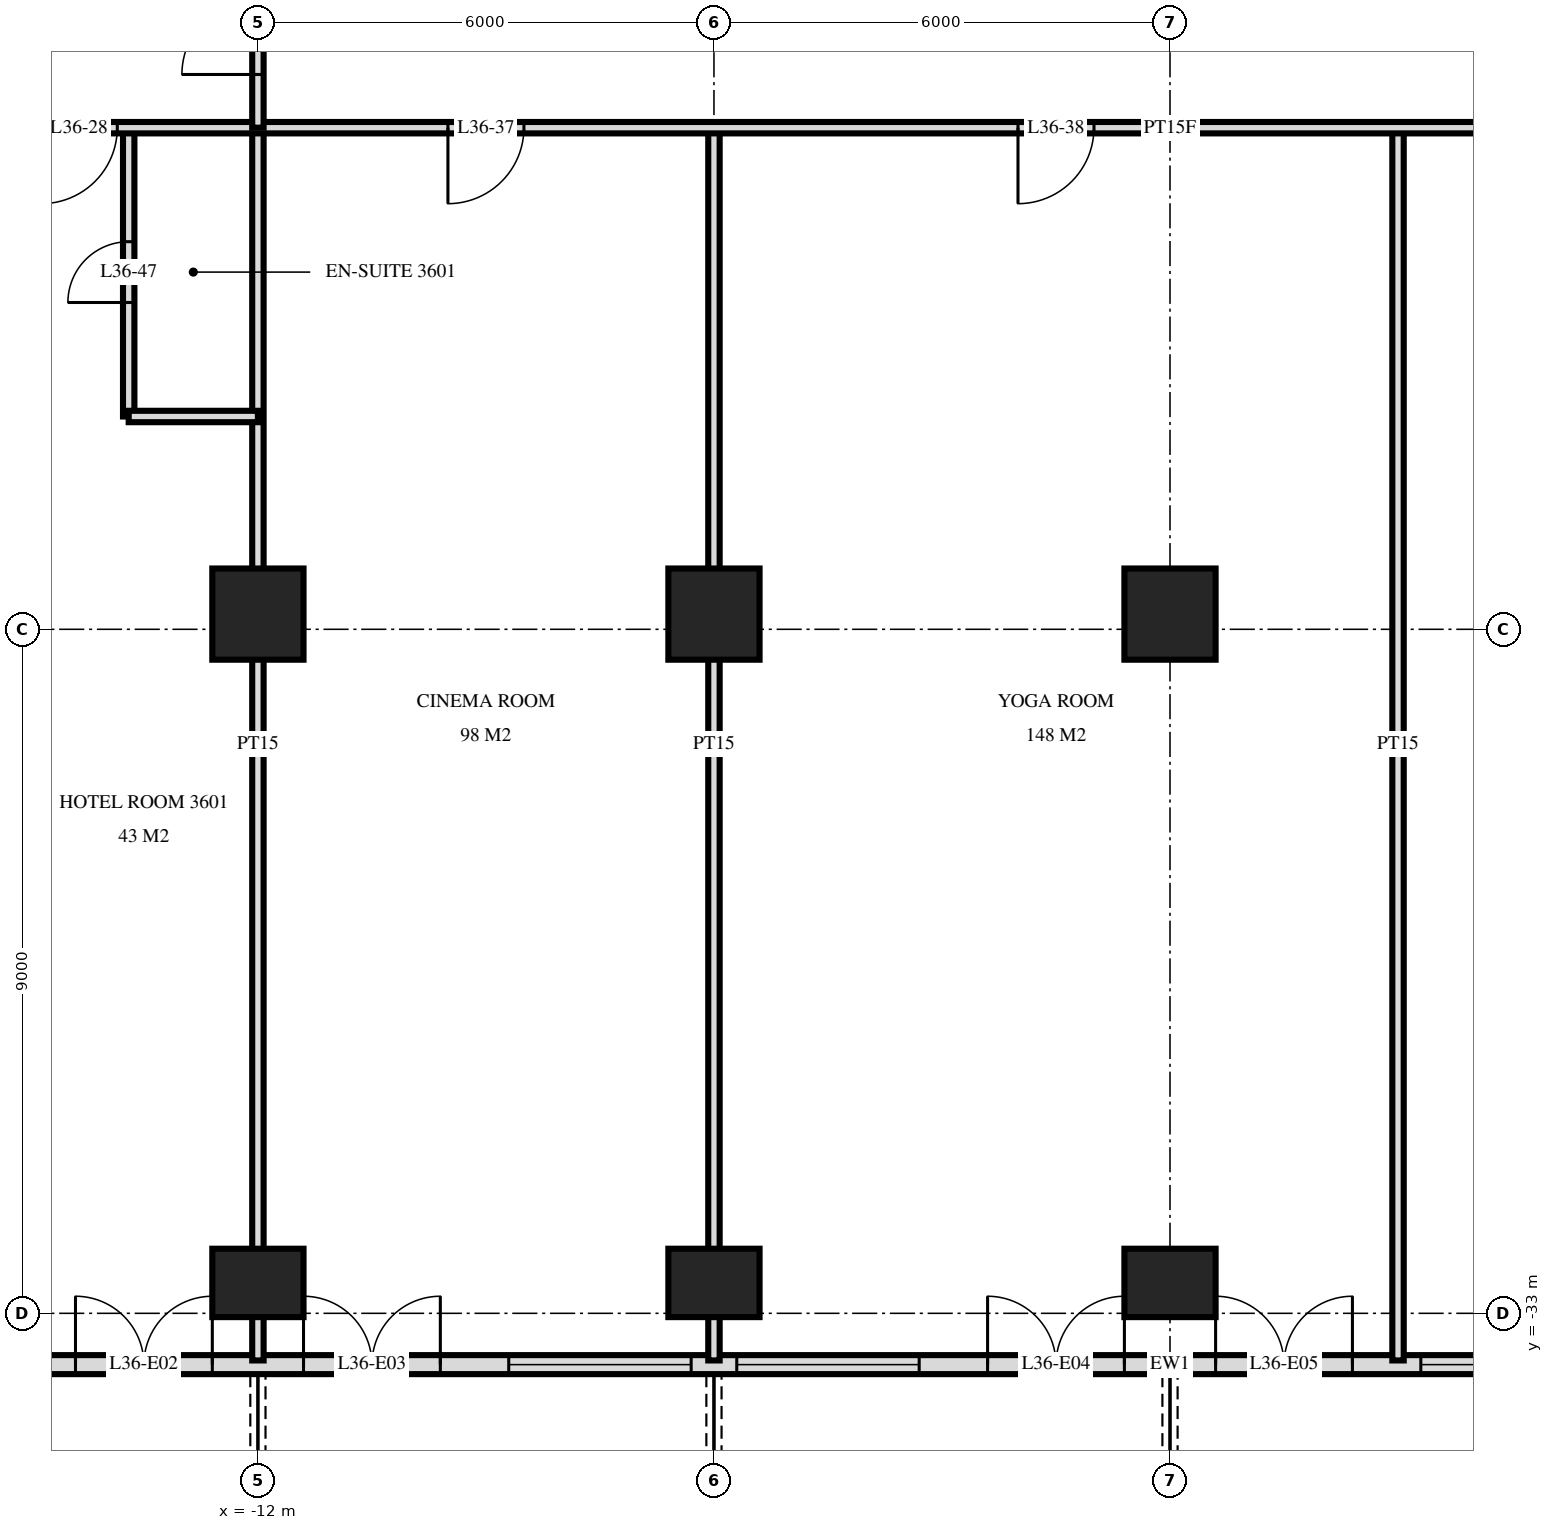
"""IFC4 building model, lengths in metres.
Left out: names, types, materials, properties, quantities, classifications, styles, units other than length and angle.
Written with IfcOpenShell. Run it as: python <this file> out.ifc"""

import sys

from ifc_helpers import new_model, si_unit, direction, frame, frame_2d, origin, origin_2d, place, context, subcontext, project, spatial, rectangle, extrude, element, fill, save


model = new_model("IFC4")
c1 = context("Model", 3, precision=1e-05, world=origin(), true_north=direction((0.0, 1.0)))
c2 = subcontext(c1, "Body", "Model", "MODEL_VIEW")
j1 = project(units=[si_unit("LENGTHUNIT", "METRE"), si_unit("PLANEANGLEUNIT", "RADIAN")], contexts=[c1])
p1 = place(None, origin())
s1 = spatial("IfcSite", under=j1, at=p1, CompositionType="ELEMENT")
p2 = place(p1, origin())
s2 = spatial("IfcBuilding", under=s1, at=p2, CompositionType="ELEMENT")
p3 = place(p2, frame((0.0, 0.0, 141.6)))
s3 = spatial("IfcBuildingStorey", under=s2, at=p3, CompositionType="ELEMENT", Elevation=141.6)
p4 = place(p3, frame((-12.0, -32.6, 0.0), z_axis=(0.0, 0.0, 1.0), x_axis=(1.0, 0.0, 0.0)))
e1 = element("IfcColumn", 1, at=p4, inside=s3, PredefinedType="COLUMN", context=c2, shape_type="SweptSolid", body=[
    extrude(rectangle(XDim=1.2, YDim=0.9, at=origin_2d()), origin(), (0.0, 0.0, 1.0), 3.6),
])
p5 = place(p3, frame((-12.0, -23.8, 0.0), z_axis=(0.0, 0.0, 1.0), x_axis=(1.0, 0.0, 0.0)))
e2 = element("IfcColumn", 2, at=p5, inside=s3, PredefinedType="COLUMN", context=c2, shape_type="SweptSolid", body=[
    extrude(rectangle(XDim=1.2, YDim=1.2, at=origin_2d()), origin(), (0.0, 0.0, 1.0), 3.6),
])
p6 = place(p3, frame((-6.0, -32.6, 0.0), z_axis=(0.0, 0.0, 1.0), x_axis=(1.0, 0.0, 0.0)))
e3 = element("IfcColumn", 3, at=p6, inside=s3, PredefinedType="COLUMN", context=c2, shape_type="SweptSolid", body=[
    extrude(rectangle(XDim=1.2, YDim=0.9, at=origin_2d()), origin(), (0.0, 0.0, 1.0), 3.6),
])
p7 = place(p3, frame((-6.0, -23.8, 0.0), z_axis=(0.0, 0.0, 1.0), x_axis=(1.0, 0.0, 0.0)))
e4 = element("IfcColumn", 4, at=p7, inside=s3, PredefinedType="COLUMN", context=c2, shape_type="SweptSolid", body=[
    extrude(rectangle(XDim=1.2, YDim=1.2, at=origin_2d()), origin(), (0.0, 0.0, 1.0), 3.6),
])
p8 = place(p3, frame((0.0, -32.6, 0.0), z_axis=(0.0, 0.0, 1.0), x_axis=(1.0, 0.0, 0.0)))
e5 = element("IfcColumn", 5, at=p8, inside=s3, PredefinedType="COLUMN", context=c2, shape_type="SweptSolid", body=[
    extrude(rectangle(XDim=1.2, YDim=0.9, at=origin_2d()), origin(), (0.0, 0.0, 1.0), 3.6),
])
p9 = place(p3, frame((0.0, -23.8, 0.0), z_axis=(0.0, 0.0, 1.0), x_axis=(1.0, 0.0, 0.0)))
e6 = element("IfcColumn", 6, at=p9, inside=s3, PredefinedType="COLUMN", context=c2, shape_type="SweptSolid", body=[
    extrude(rectangle(XDim=1.2, YDim=1.2, at=origin_2d()), origin(), (0.0, 0.0, 1.0), 3.6),
])
p10 = place(p3, frame((-23.675, -33.675, 0.0), z_axis=(0.0, 0.0, 1.0), x_axis=(1.0, 0.0, 0.0)))
e7 = element("IfcWall", 7, at=p10, inside=s3, PredefinedType="SOLIDWALL", context=c2, shape_type="SweptSolid", body=[
    extrude(rectangle(XDim=47.351, YDim=0.25, at=frame_2d((23.675, 0.0))), origin(), (0.0, 0.0, 1.0), 3.32),
])
p11 = place(p10, frame((0.575, 0.0, 0.0)))
e8 = element("IfcOpeningElement", 8, at=p11, cuts=e7, PredefinedType="OPENING", context=c2, shape_type="SweptSolid", body=[
    extrude(rectangle(XDim=1.8, YDim=2.4, at=frame_2d((0.9, 1.2))), frame((0.0, 0.135, 0.0), z_axis=(0.0, -1.0, 0.0), x_axis=(1.0, 0.0, 0.0)), (0.0, 0.0, 1.0), 0.27),
])
p12 = place(p10, frame((3.425, 0.0, 0.3)))
e9 = element("IfcOpeningElement", 9, at=p12, cuts=e7, PredefinedType="OPENING", context=c2, shape_type="SweptSolid", body=[
    extrude(rectangle(XDim=1.8, YDim=2.1, at=frame_2d((0.9, 1.05))), frame((0.0, 0.135, 0.0), z_axis=(0.0, -1.0, 0.0), x_axis=(1.0, 0.0, 0.0)), (0.0, 0.0, 1.0), 0.27),
])
p13 = place(p10, frame((5.975, 0.0, 0.3)))
e10 = element("IfcOpeningElement", 10, at=p13, cuts=e7, PredefinedType="OPENING", context=c2, shape_type="SweptSolid", body=[
    extrude(rectangle(XDim=2.4, YDim=2.1, at=frame_2d((1.2, 1.05))), frame((0.0, 0.135, 0.0), z_axis=(0.0, -1.0, 0.0), x_axis=(1.0, 0.0, 0.0)), (0.0, 0.0, 1.0), 0.27),
])
p14 = place(p10, frame((9.275, 0.0, 0.0)))
e11 = element("IfcOpeningElement", 11, at=p14, cuts=e7, PredefinedType="OPENING", context=c2, shape_type="SweptSolid", body=[
    extrude(rectangle(XDim=1.8, YDim=2.4, at=frame_2d((0.9, 1.2))), frame((0.0, 0.135, 0.0), z_axis=(0.0, -1.0, 0.0), x_axis=(1.0, 0.0, 0.0)), (0.0, 0.0, 1.0), 0.27),
])
p15 = place(p10, frame((12.275, 0.0, 0.0)))
e12 = element("IfcOpeningElement", 12, at=p15, cuts=e7, PredefinedType="OPENING", context=c2, shape_type="SweptSolid", body=[
    extrude(rectangle(XDim=1.8, YDim=2.4, at=frame_2d((0.9, 1.2))), frame((0.0, 0.135, 0.0), z_axis=(0.0, -1.0, 0.0), x_axis=(1.0, 0.0, 0.0)), (0.0, 0.0, 1.0), 0.27),
])
p16 = place(p10, frame((14.975, 0.0, 0.3)))
e13 = element("IfcOpeningElement", 13, at=p16, cuts=e7, PredefinedType="OPENING", context=c2, shape_type="SweptSolid", body=[
    extrude(rectangle(XDim=2.4, YDim=2.1, at=frame_2d((1.2, 1.05))), frame((0.0, 0.135, 0.0), z_axis=(0.0, -1.0, 0.0), x_axis=(1.0, 0.0, 0.0)), (0.0, 0.0, 1.0), 0.27),
])
p17 = place(p10, frame((17.975, 0.0, 0.3)))
e14 = element("IfcOpeningElement", 14, at=p17, cuts=e7, PredefinedType="OPENING", context=c2, shape_type="SweptSolid", body=[
    extrude(rectangle(XDim=2.4, YDim=2.1, at=frame_2d((1.2, 1.05))), frame((0.0, 0.135, 0.0), z_axis=(0.0, -1.0, 0.0), x_axis=(1.0, 0.0, 0.0)), (0.0, 0.0, 1.0), 0.27),
])
p18 = place(p10, frame((21.275, 0.0, 0.0)))
e15 = element("IfcOpeningElement", 15, at=p18, cuts=e7, PredefinedType="OPENING", context=c2, shape_type="SweptSolid", body=[
    extrude(rectangle(XDim=1.8, YDim=2.4, at=frame_2d((0.9, 1.2))), frame((0.0, 0.135, 0.0), z_axis=(0.0, -1.0, 0.0), x_axis=(1.0, 0.0, 0.0)), (0.0, 0.0, 1.0), 0.27),
])
p19 = place(p10, frame((24.275, 0.0, 0.0)))
e16 = element("IfcOpeningElement", 16, at=p19, cuts=e7, PredefinedType="OPENING", context=c2, shape_type="SweptSolid", body=[
    extrude(rectangle(XDim=1.8, YDim=2.4, at=frame_2d((0.9, 1.2))), frame((0.0, 0.135, 0.0), z_axis=(0.0, -1.0, 0.0), x_axis=(1.0, 0.0, 0.0)), (0.0, 0.0, 1.0), 0.27),
])
p20 = place(p10, frame((26.975, 0.0, 0.3)))
e17 = element("IfcOpeningElement", 17, at=p20, cuts=e7, PredefinedType="OPENING", context=c2, shape_type="SweptSolid", body=[
    extrude(rectangle(XDim=2.4, YDim=2.1, at=frame_2d((1.2, 1.05))), frame((0.0, 0.135, 0.0), z_axis=(0.0, -1.0, 0.0), x_axis=(1.0, 0.0, 0.0)), (0.0, 0.0, 1.0), 0.27),
])
p21 = place(p10, frame((30.275, 0.0, 0.0)))
e18 = element("IfcOpeningElement", 18, at=p21, cuts=e7, PredefinedType="OPENING", context=c2, shape_type="SweptSolid", body=[
    extrude(rectangle(XDim=1.8, YDim=2.4, at=frame_2d((0.9, 1.2))), frame((0.0, 0.135, 0.0), z_axis=(0.0, -1.0, 0.0), x_axis=(1.0, 0.0, 0.0)), (0.0, 0.0, 1.0), 0.27),
])
p22 = place(p10, frame((32.975, 0.0, 0.3)))
e19 = element("IfcOpeningElement", 19, at=p22, cuts=e7, PredefinedType="OPENING", context=c2, shape_type="SweptSolid", body=[
    extrude(rectangle(XDim=2.4, YDim=2.1, at=frame_2d((1.2, 1.05))), frame((0.0, 0.135, 0.0), z_axis=(0.0, -1.0, 0.0), x_axis=(1.0, 0.0, 0.0)), (0.0, 0.0, 1.0), 0.27),
])
p23 = place(p10, frame((36.275, 0.0, 0.0)))
e20 = element("IfcOpeningElement", 20, at=p23, cuts=e7, PredefinedType="OPENING", context=c2, shape_type="SweptSolid", body=[
    extrude(rectangle(XDim=1.8, YDim=2.4, at=frame_2d((0.9, 1.2))), frame((0.0, 0.135, 0.0), z_axis=(0.0, -1.0, 0.0), x_axis=(1.0, 0.0, 0.0)), (0.0, 0.0, 1.0), 0.27),
])
p24 = place(p10, frame((38.975, 0.0, 0.3)))
e21 = element("IfcOpeningElement", 21, at=p24, cuts=e7, PredefinedType="OPENING", context=c2, shape_type="SweptSolid", body=[
    extrude(rectangle(XDim=2.4, YDim=2.1, at=frame_2d((1.2, 1.05))), frame((0.0, 0.135, 0.0), z_axis=(0.0, -1.0, 0.0), x_axis=(1.0, 0.0, 0.0)), (0.0, 0.0, 1.0), 0.27),
])
p25 = place(p10, frame((42.275, 0.0, 0.0)))
e22 = element("IfcOpeningElement", 22, at=p25, cuts=e7, PredefinedType="OPENING", context=c2, shape_type="SweptSolid", body=[
    extrude(rectangle(XDim=1.8, YDim=2.4, at=frame_2d((0.9, 1.2))), frame((0.0, 0.135, 0.0), z_axis=(0.0, -1.0, 0.0), x_axis=(1.0, 0.0, 0.0)), (0.0, 0.0, 1.0), 0.27),
])
p26 = place(p10, frame((45.125, 0.0, 0.3)))
e23 = element("IfcOpeningElement", 23, at=p26, cuts=e7, PredefinedType="OPENING", context=c2, shape_type="SweptSolid", body=[
    extrude(rectangle(XDim=1.8, YDim=2.1, at=frame_2d((0.9, 1.05))), frame((0.0, 0.135, 0.0), z_axis=(0.0, -1.0, 0.0), x_axis=(1.0, 0.0, 0.0)), (0.0, 0.0, 1.0), 0.27),
])
for number, where, z_axis, x_axis in (
    (24, (3.0, -33.62, 0.0), (0.0, 0.0, 1.0), (0.0, 1.0, 0.0)),
    (25, (-6.0, -33.62, 0.0), (0.0, 0.0, 1.0), (0.0, 1.0, 0.0)),
):
    element("IfcWall", number, at=place(p3, frame(where, z_axis=z_axis, x_axis=x_axis)), inside=s3, PredefinedType="PARTITIONING", context=c2, shape_type="SweptSolid", body=[
        extrude(rectangle(XDim=16.22, YDim=0.15, at=frame_2d((8.11, 0.0))), origin(), (0.0, 0.0, 1.0), 3.32),
    ])
p27 = place(p3, frame((-12.0, -17.4, 0.0), z_axis=(0.0, 0.0, 1.0), x_axis=(0.0, 1.0, 0.0)))
e26 = element("IfcWall", 26, at=p27, inside=s3, PredefinedType="PARTITIONING", context=c2, shape_type="SweptSolid", body=[
    extrude(rectangle(XDim=2.35, YDim=0.15, at=frame_2d((1.175, 0.0))), origin(), (0.0, 0.0, 1.0), 3.32),
])
p28 = place(p27, frame((0.7, 0.0, 0.0)))
e27 = element("IfcOpeningElement", 27, at=p28, cuts=e26, PredefinedType="OPENING", context=c2, shape_type="SweptSolid", body=[
    extrude(rectangle(XDim=1.0, YDim=2.1, at=frame_2d((0.5, 1.05))), frame((0.0, 0.085, 0.0), z_axis=(0.0, -1.0, 0.0), x_axis=(1.0, 0.0, 0.0)), (0.0, 0.0, 1.0), 0.17),
])
p29 = place(p3, frame((-12.0, -33.62, 0.0), z_axis=(0.0, 0.0, 1.0), x_axis=(0.0, 1.0, 0.0)))
e28 = element("IfcWall", 28, at=p29, inside=s3, PredefinedType="PARTITIONING", context=c2, shape_type="SweptSolid", body=[
    extrude(rectangle(XDim=16.22, YDim=0.15, at=frame_2d((8.11, 0.0))), origin(), (0.0, 0.0, 1.0), 3.32),
])
p30 = place(p3, frame((-13.7, -21.2, 0.0), z_axis=(0.0, 0.0, 1.0), x_axis=(0.0, 1.0, 0.0)))
e29 = element("IfcWall", 29, at=p30, inside=s3, PredefinedType="PARTITIONING", context=c2, shape_type="SweptSolid", body=[
    extrude(rectangle(XDim=3.8, YDim=0.15, at=frame_2d((1.9, 0.0))), origin(), (0.0, 0.0, 1.0), 3.32),
])
p31 = place(p30, frame((1.5, 0.0, 0.0)))
e30 = element("IfcOpeningElement", 30, at=p31, cuts=e29, PredefinedType="OPENING", context=c2, shape_type="SweptSolid", body=[
    extrude(rectangle(XDim=0.8, YDim=2.1, at=frame_2d((0.4, 1.05))), frame((0.0, 0.085, 0.0), z_axis=(0.0, -1.0, 0.0), x_axis=(1.0, 0.0, 0.0)), (0.0, 0.0, 1.0), 0.17),
])
p32 = place(p3, frame((-13.7, -21.2, 0.0), z_axis=(0.0, 0.0, 1.0), x_axis=(1.0, 0.0, 0.0)))
e31 = element("IfcWall", 31, at=p32, inside=s3, PredefinedType="PARTITIONING", context=c2, shape_type="SweptSolid", body=[
    extrude(rectangle(XDim=1.7, YDim=0.15, at=frame_2d((0.85, 0.0))), origin(), (0.0, 0.0, 1.0), 3.32),
])
p33 = place(p3, frame((-28.02, -17.4, 0.0), z_axis=(0.0, 0.0, 1.0), x_axis=(1.0, 0.0, 0.0)))
e32 = element("IfcWall", 32, at=p33, inside=s3, PredefinedType="PARTITIONING", context=c2, shape_type="SweptSolid", body=[
    extrude(rectangle(XDim=56.04, YDim=0.15, at=frame_2d((28.02, 0.0))), origin(), (0.0, 0.0, 1.0), 3.32),
])
p34 = place(p33, frame((13.17, 0.0, 0.0)))
e33 = element("IfcOpeningElement", 33, at=p34, cuts=e32, PredefinedType="OPENING", context=c2, shape_type="SweptSolid", body=[
    extrude(rectangle(XDim=1.0, YDim=2.1, at=frame_2d((0.5, 1.05))), frame((0.0, 0.085, 0.0), z_axis=(0.0, -1.0, 0.0), x_axis=(1.0, 0.0, 0.0)), (0.0, 0.0, 1.0), 0.17),
])
p35 = place(p33, frame((11.87, 0.0, 0.0)))
e34 = element("IfcOpeningElement", 34, at=p35, cuts=e32, PredefinedType="OPENING", context=c2, shape_type="SweptSolid", body=[
    extrude(rectangle(XDim=1.0, YDim=2.1, at=frame_2d((0.5, 1.05))), frame((0.0, 0.085, 0.0), z_axis=(0.0, -1.0, 0.0), x_axis=(1.0, 0.0, 0.0)), (0.0, 0.0, 1.0), 0.17),
])
p36 = place(p33, frame((2.32, 0.0, 0.0)))
e35 = element("IfcOpeningElement", 35, at=p36, cuts=e32, PredefinedType="OPENING", context=c2, shape_type="SweptSolid", body=[
    extrude(rectangle(XDim=1.0, YDim=2.1, at=frame_2d((0.5, 1.05))), frame((0.0, 0.085, 0.0), z_axis=(0.0, -1.0, 0.0), x_axis=(1.0, 0.0, 0.0)), (0.0, 0.0, 1.0), 0.17),
])
p37 = place(p33, frame((40.17, 0.0, 0.0)))
e36 = element("IfcOpeningElement", 36, at=p37, cuts=e32, PredefinedType="OPENING", context=c2, shape_type="SweptSolid", body=[
    extrude(rectangle(XDim=1.0, YDim=2.1, at=frame_2d((0.5, 1.05))), frame((0.0, 0.085, 0.0), z_axis=(0.0, -1.0, 0.0), x_axis=(1.0, 0.0, 0.0)), (0.0, 0.0, 1.0), 0.17),
])
p38 = place(p33, frame((51.22, 0.0, 0.0)))
e37 = element("IfcOpeningElement", 37, at=p38, cuts=e32, PredefinedType="OPENING", context=c2, shape_type="SweptSolid", body=[
    extrude(rectangle(XDim=1.0, YDim=2.1, at=frame_2d((0.5, 1.05))), frame((0.0, 0.085, 0.0), z_axis=(0.0, -1.0, 0.0), x_axis=(1.0, 0.0, 0.0)), (0.0, 0.0, 1.0), 0.17),
])
p39 = place(p33, frame((18.52, 0.0, 0.0)))
e38 = element("IfcOpeningElement", 38, at=p39, cuts=e32, PredefinedType="OPENING", context=c2, shape_type="SweptSolid", body=[
    extrude(rectangle(XDim=1.0, YDim=2.1, at=frame_2d((0.5, 1.05))), frame((0.0, 0.085, 0.0), z_axis=(0.0, -1.0, 0.0), x_axis=(1.0, 0.0, 0.0)), (0.0, 0.0, 1.0), 0.17),
])
p40 = place(p33, frame((26.02, 0.0, 0.0)))
e39 = element("IfcOpeningElement", 39, at=p40, cuts=e32, PredefinedType="OPENING", context=c2, shape_type="SweptSolid", body=[
    extrude(rectangle(XDim=1.0, YDim=2.1, at=frame_2d((0.5, 1.05))), frame((0.0, 0.085, 0.0), z_axis=(0.0, -1.0, 0.0), x_axis=(1.0, 0.0, 0.0)), (0.0, 0.0, 1.0), 0.17),
])
p41 = place(p33, frame((35.02, 0.0, 0.0)))
e40 = element("IfcOpeningElement", 40, at=p41, cuts=e32, PredefinedType="OPENING", context=c2, shape_type="SweptSolid", body=[
    extrude(rectangle(XDim=1.0, YDim=2.1, at=frame_2d((0.5, 1.05))), frame((0.0, 0.085, 0.0), z_axis=(0.0, -1.0, 0.0), x_axis=(1.0, 0.0, 0.0)), (0.0, 0.0, 1.0), 0.17),
])
p42 = place(p14, origin())
e41 = element("IfcDoor", 41, at=p42, inside=s3, OperationType="DOUBLE_DOOR_SINGLE_SWING", PredefinedType="DOOR", context=c2, shape_type="SweptSolid", body=[
    extrude(rectangle(XDim=1.8, YDim=2.4, at=frame_2d((0.9, 1.2))), frame((0.0, 0.025, 0.0), z_axis=(0.0, -1.0, 0.0), x_axis=(1.0, 0.0, 0.0)), (0.0, 0.0, 1.0), 0.05),
])
fill(e11, e41)
p43 = place(p15, origin())
e42 = element("IfcDoor", 42, at=p43, inside=s3, OperationType="DOUBLE_DOOR_SINGLE_SWING", PredefinedType="DOOR", context=c2, shape_type="SweptSolid", body=[
    extrude(rectangle(XDim=1.8, YDim=2.4, at=frame_2d((0.9, 1.2))), frame((0.0, 0.025, 0.0), z_axis=(0.0, -1.0, 0.0), x_axis=(1.0, 0.0, 0.0)), (0.0, 0.0, 1.0), 0.05),
])
fill(e12, e42)
p44 = place(p16, origin())
e43 = element("IfcWindow", 43, at=p44, inside=s3, PartitioningType="SINGLE_PANEL", PredefinedType="WINDOW", context=c2, shape_type="SweptSolid", body=[
    extrude(rectangle(XDim=2.4, YDim=2.1, at=frame_2d((1.2, 1.05))), frame((0.0, 0.03, 0.0), z_axis=(0.0, -1.0, 0.0), x_axis=(1.0, 0.0, 0.0)), (0.0, 0.0, 1.0), 0.06),
])
fill(e13, e43)
p45 = place(p17, origin())
e44 = element("IfcWindow", 44, at=p45, inside=s3, PartitioningType="SINGLE_PANEL", PredefinedType="WINDOW", context=c2, shape_type="SweptSolid", body=[
    extrude(rectangle(XDim=2.4, YDim=2.1, at=frame_2d((1.2, 1.05))), frame((0.0, 0.03, 0.0), z_axis=(0.0, -1.0, 0.0), x_axis=(1.0, 0.0, 0.0)), (0.0, 0.0, 1.0), 0.06),
])
fill(e14, e44)
p46 = place(p18, origin())
e45 = element("IfcDoor", 45, at=p46, inside=s3, OperationType="DOUBLE_DOOR_SINGLE_SWING", PredefinedType="DOOR", context=c2, shape_type="SweptSolid", body=[
    extrude(rectangle(XDim=1.8, YDim=2.4, at=frame_2d((0.9, 1.2))), frame((0.0, 0.025, 0.0), z_axis=(0.0, -1.0, 0.0), x_axis=(1.0, 0.0, 0.0)), (0.0, 0.0, 1.0), 0.05),
])
fill(e15, e45)
p47 = place(p19, origin())
e46 = element("IfcDoor", 46, at=p47, inside=s3, OperationType="DOUBLE_DOOR_SINGLE_SWING", PredefinedType="DOOR", context=c2, shape_type="SweptSolid", body=[
    extrude(rectangle(XDim=1.8, YDim=2.4, at=frame_2d((0.9, 1.2))), frame((0.0, 0.025, 0.0), z_axis=(0.0, -1.0, 0.0), x_axis=(1.0, 0.0, 0.0)), (0.0, 0.0, 1.0), 0.05),
])
fill(e16, e46)
p48 = place(p20, origin())
e47 = element("IfcWindow", 47, at=p48, inside=s3, PartitioningType="SINGLE_PANEL", PredefinedType="WINDOW", context=c2, shape_type="SweptSolid", body=[
    extrude(rectangle(XDim=2.4, YDim=2.1, at=frame_2d((1.2, 1.05))), frame((0.0, 0.03, 0.0), z_axis=(0.0, -1.0, 0.0), x_axis=(1.0, 0.0, 0.0)), (0.0, 0.0, 1.0), 0.06),
])
fill(e17, e47)
p49 = place(p28, origin())
e48 = element("IfcDoor", 48, at=p49, inside=s3, OperationType="SINGLE_SWING_RIGHT", PredefinedType="DOOR", context=c2, shape_type="SweptSolid", body=[
    extrude(rectangle(XDim=1.0, YDim=2.1, at=frame_2d((0.5, 1.05))), frame((0.0, 0.025, 0.0), z_axis=(0.0, -1.0, 0.0), x_axis=(1.0, 0.0, 0.0)), (0.0, 0.0, 1.0), 0.05),
])
fill(e27, e48)
p50 = place(p34, frame((0.5, 0.0, 0.0), z_axis=(0.0, 0.0, 1.0), x_axis=(-1.0, 0.0, 0.0)))
e49 = element("IfcDoor", 49, at=p50, inside=s3, OperationType="SINGLE_SWING_LEFT", PredefinedType="DOOR", context=c2, shape_type="SweptSolid", body=[
    extrude(rectangle(XDim=1.0, YDim=2.1, at=frame_2d((0.0, 1.05))), frame((0.0, -0.025, 0.0), z_axis=(0.0, 1.0, 0.0), x_axis=(-1.0, 0.0, 0.0)), (0.0, 0.0, 1.0), 0.05),
])
fill(e33, e49)
p51 = place(p39, frame((0.5, 0.0, 0.0), z_axis=(0.0, 0.0, 1.0), x_axis=(-1.0, 0.0, 0.0)))
e50 = element("IfcDoor", 50, at=p51, inside=s3, OperationType="SINGLE_SWING_LEFT", PredefinedType="DOOR", context=c2, shape_type="SweptSolid", body=[
    extrude(rectangle(XDim=1.0, YDim=2.1, at=frame_2d((0.0, 1.05))), frame((0.0, -0.025, 0.0), z_axis=(0.0, 1.0, 0.0), x_axis=(-1.0, 0.0, 0.0)), (0.0, 0.0, 1.0), 0.05),
])
fill(e38, e50)
p52 = place(p40, frame((0.5, 0.0, 0.0), z_axis=(0.0, 0.0, 1.0), x_axis=(-1.0, 0.0, 0.0)))
e51 = element("IfcDoor", 51, at=p52, inside=s3, OperationType="SINGLE_SWING_LEFT", PredefinedType="DOOR", context=c2, shape_type="SweptSolid", body=[
    extrude(rectangle(XDim=1.0, YDim=2.1, at=frame_2d((0.0, 1.05))), frame((0.0, -0.025, 0.0), z_axis=(0.0, 1.0, 0.0), x_axis=(-1.0, 0.0, 0.0)), (0.0, 0.0, 1.0), 0.05),
])
fill(e39, e51)
p53 = place(p31, origin())
e52 = element("IfcDoor", 52, at=p53, inside=s3, OperationType="SINGLE_SWING_RIGHT", PredefinedType="DOOR", context=c2, shape_type="SweptSolid", body=[
    extrude(rectangle(XDim=0.8, YDim=2.1, at=frame_2d((0.4, 1.05))), frame((0.0, 0.025, 0.0), z_axis=(0.0, -1.0, 0.0), x_axis=(1.0, 0.0, 0.0)), (0.0, 0.0, 1.0), 0.05),
])
fill(e30, e52)
save(model, sys.argv[1])
